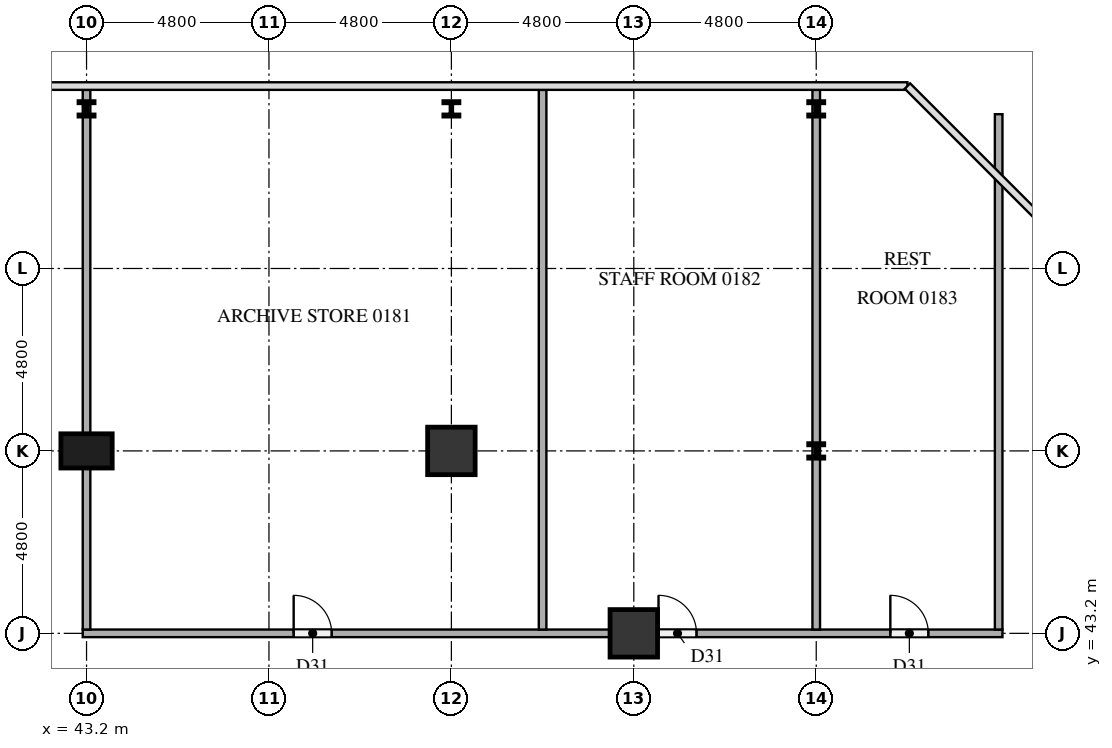
"""IFC4 building model, lengths in metres.
Left out: names, types, materials, properties, quantities, classifications, styles, units other than length and angle.
Written with IfcOpenShell. Run it as: python <this file> out.ifc"""

import sys

from ifc_helpers import new_model, si_unit, direction, frame, frame_2d, origin, origin_2d, place, context, subcontext, project, spatial, rectangle, i_section, extrude, element, fill, save


model = new_model("IFC4")
c1 = context("Model", 3, precision=1e-05, world=origin(), true_north=direction((0.0, 1.0)))
c2 = subcontext(c1, "Body", "Model", "MODEL_VIEW")
j1 = project(units=[si_unit("LENGTHUNIT", "METRE"), si_unit("PLANEANGLEUNIT", "RADIAN")], contexts=[c1])
p1 = place(None, origin())
s1 = spatial("IfcSite", under=j1, at=p1, CompositionType="ELEMENT")
p2 = place(p1, origin())
s2 = spatial("IfcBuilding", under=s1, at=p2, CompositionType="ELEMENT")
p3 = place(p2, frame((0.0, 0.0, 6.0)))
s3 = spatial("IfcBuildingStorey", under=s2, at=p3, CompositionType="ELEMENT", Elevation=6.0)
for number, where, z_axis, x_axis in (
    (1, (57.6, 43.2, 0.0), (0.0, 0.0, 1.0), (1.0, 0.0, 0.0)),
    (2, (52.8, 48.0, 0.0), (0.0, 0.0, 1.0), (1.0, 0.0, 0.0)),
):
    element("IfcColumn", number, at=place(p3, frame(where, z_axis=z_axis, x_axis=x_axis)), inside=s3, PredefinedType="COLUMN", context=c2, shape_type="SweptSolid", body=[
        extrude(rectangle(XDim=1.25, YDim=1.25, at=origin_2d()), origin(), (0.0, 0.0, 1.0), 4.2),
    ])
p4 = place(p3, frame((43.2, 48.0, 0.0), z_axis=(0.0, 0.0, 1.0), x_axis=(1.0, 0.0, 0.0)))
e3 = element("IfcColumn", 3, at=p4, inside=s3, PredefinedType="COLUMN", context=c2, shape_type="SweptSolid", body=[
    extrude(rectangle(XDim=1.35, YDim=0.9, at=origin_2d()), origin(), (0.0, 0.0, 1.0), 4.2),
])
for number, where, z_axis, x_axis in (
    (4, (43.2, 57.0, 0.0), (0.0, 0.0, 1.0), (1.0, 0.0, 0.0)),
    (5, (52.8, 57.0, 0.0), (0.0, 0.0, 1.0), (1.0, 0.0, 0.0)),
    (6, (62.4, 48.0, 0.0), (0.0, 0.0, 1.0), (1.0, 0.0, 0.0)),
    (7, (62.4, 57.0, 0.0), (0.0, 0.0, 1.0), (1.0, 0.0, 0.0)),
):
    element("IfcColumn", number, at=place(p3, frame(where, z_axis=z_axis, x_axis=x_axis)), inside=s3, PredefinedType="COLUMN", context=c2, shape_type="SweptSolid", body=[
        extrude(i_section(OverallWidth=0.396, OverallDepth=0.381, WebThickness=0.019, FlangeThickness=0.03, at=origin_2d()), origin(), (0.0, 0.0, 1.0), 4.2),
    ])
p5 = place(p3, frame((43.1, 43.2, 0.0), z_axis=(0.0, 0.0, 1.0), x_axis=(1.0, 0.0, 0.0)))
e8 = element("IfcWall", 8, at=p5, inside=s3, PredefinedType="PARTITIONING", context=c2, shape_type="SweptSolid", body=[
    extrude(rectangle(XDim=24.2, YDim=0.2, at=frame_2d((12.1, 0.0))), origin(), (0.0, 0.0, 1.0), 4.2),
])
p6 = place(p5, frame((5.55, 0.0, 0.0)))
e9 = element("IfcOpeningElement", 9, at=p6, cuts=e8, PredefinedType="OPENING", context=c2, shape_type="SweptSolid", body=[
    extrude(rectangle(XDim=1.0, YDim=2.1, at=frame_2d((0.5, 1.05))), frame((0.0, 0.11, 0.0), z_axis=(0.0, -1.0, 0.0), x_axis=(1.0, 0.0, 0.0)), (0.0, 0.0, 1.0), 0.22),
])
p7 = place(p5, frame((15.15, 0.0, 0.0)))
e10 = element("IfcOpeningElement", 10, at=p7, cuts=e8, PredefinedType="OPENING", context=c2, shape_type="SweptSolid", body=[
    extrude(rectangle(XDim=1.0, YDim=2.1, at=frame_2d((0.5, 1.05))), frame((0.0, 0.11, 0.0), z_axis=(0.0, -1.0, 0.0), x_axis=(1.0, 0.0, 0.0)), (0.0, 0.0, 1.0), 0.22),
])
p8 = place(p5, frame((21.25, 0.0, 0.0)))
e11 = element("IfcOpeningElement", 11, at=p8, cuts=e8, PredefinedType="OPENING", context=c2, shape_type="SweptSolid", body=[
    extrude(rectangle(XDim=1.0, YDim=2.1, at=frame_2d((0.5, 1.05))), frame((0.0, 0.11, 0.0), z_axis=(0.0, -1.0, 0.0), x_axis=(1.0, 0.0, 0.0)), (0.0, 0.0, 1.0), 0.22),
])
for number, where, z_axis, x_axis in (
    (12, (43.2, 43.3, 0.0), (0.0, 0.0, 1.0), (0.0, 1.0, 0.0)),
    (13, (55.2, 43.3, 0.0), (0.0, 0.0, 1.0), (0.0, 1.0, 0.0)),
    (14, (62.4, 43.3, 0.0), (0.0, 0.0, 1.0), (0.0, 1.0, 0.0)),
):
    element("IfcWall", number, at=place(p3, frame(where, z_axis=z_axis, x_axis=x_axis)), inside=s3, PredefinedType="PARTITIONING", context=c2, shape_type="SweptSolid", body=[
        extrude(rectangle(XDim=14.2, YDim=0.2, at=frame_2d((7.1, 0.0))), origin(), (0.0, 0.0, 1.0), 4.2),
    ])
p9 = place(p3, frame((67.2, 43.3, 0.0), z_axis=(0.0, 0.0, 1.0), x_axis=(0.0, 1.0, 0.0)))
e15 = element("IfcWall", 15, at=p9, inside=s3, PredefinedType="PARTITIONING", context=c2, shape_type="SweptSolid", body=[
    extrude(rectangle(XDim=13.56, YDim=0.2, at=frame_2d((6.78, 0.0))), origin(), (0.0, 0.0, 1.0), 4.2),
])
p10 = place(p6, origin())
e16 = element("IfcDoor", 16, at=p10, inside=s3, OperationType="SINGLE_SWING_LEFT", PredefinedType="DOOR", context=c2, shape_type="SweptSolid", body=[
    extrude(rectangle(XDim=1.0, YDim=2.1, at=frame_2d((0.5, 1.05))), frame((0.0, 0.025, 0.0), z_axis=(0.0, -1.0, 0.0), x_axis=(1.0, 0.0, 0.0)), (0.0, 0.0, 1.0), 0.05),
])
fill(e9, e16)
p11 = place(p7, origin())
e17 = element("IfcDoor", 17, at=p11, inside=s3, OperationType="SINGLE_SWING_LEFT", PredefinedType="DOOR", context=c2, shape_type="SweptSolid", body=[
    extrude(rectangle(XDim=1.0, YDim=2.1, at=frame_2d((0.5, 1.05))), frame((0.0, 0.025, 0.0), z_axis=(0.0, -1.0, 0.0), x_axis=(1.0, 0.0, 0.0)), (0.0, 0.0, 1.0), 0.05),
])
fill(e10, e17)
p12 = place(p8, origin())
e18 = element("IfcDoor", 18, at=p12, inside=s3, OperationType="SINGLE_SWING_LEFT", PredefinedType="DOOR", context=c2, shape_type="SweptSolid", body=[
    extrude(rectangle(XDim=1.0, YDim=2.1, at=frame_2d((0.5, 1.05))), frame((0.0, 0.025, 0.0), z_axis=(0.0, -1.0, 0.0), x_axis=(1.0, 0.0, 0.0)), (0.0, 0.0, 1.0), 0.05),
])
fill(e11, e18)
save(model, sys.argv[1])
